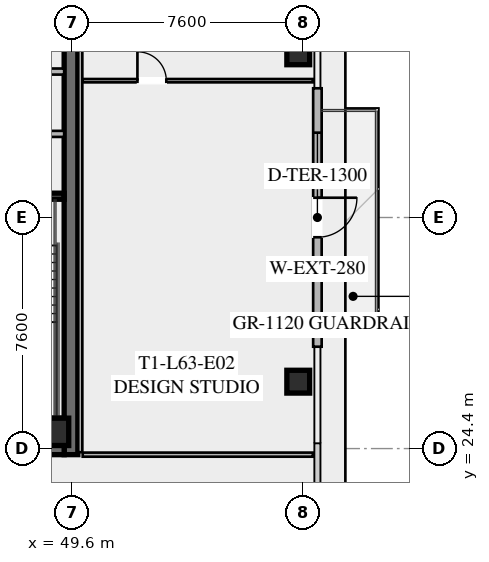
"""IFC4 building model, lengths in metres.
Left out: names, types, materials, properties, quantities, classifications, styles, units other than length and angle.
Written with IfcOpenShell. Run it as: python <this file> out.ifc"""

import sys

from ifc_helpers import new_model, si_unit, direction, frame, frame_2d, origin, origin_2d, place, context, subcontext, project, spatial, rectangle, hollow_rectangle, extrude, element, fill, save


model = new_model("IFC4")
c1 = context("Model", 3, precision=1e-05, world=origin(), true_north=direction((0.0, 1.0)))
c2 = subcontext(c1, "Body", "Model", "MODEL_VIEW")
j1 = project(units=[si_unit("LENGTHUNIT", "METRE"), si_unit("PLANEANGLEUNIT", "RADIAN")], contexts=[c1])
p1 = place(None, origin())
s1 = spatial("IfcSite", under=j1, at=p1, CompositionType="ELEMENT")
p2 = place(p1, origin())
s2 = spatial("IfcBuilding", under=s1, at=p2, CompositionType="ELEMENT")
p3 = place(p2, frame((0.0, 0.0, 232.6)))
s3 = spatial("IfcBuildingStorey", under=s2, at=p3, CompositionType="ELEMENT", Elevation=232.6)
p4 = place(p3, frame((49.575, 39.8, 0.0), z_axis=(0.0, 0.0, 1.0), x_axis=(0.0, -1.0, 0.0)))
e1 = element("IfcWall", 1, at=p4, inside=s3, PredefinedType="SHEAR", context=c2, shape_type="SweptSolid", body=[
    extrude(rectangle(XDim=15.6, YDim=0.45, at=frame_2d((7.8, 0.0))), origin(), (0.0, 0.0, 1.0), 3.55),
])
p5 = place(p3, frame((49.35, 24.425, 0.0), z_axis=(0.0, 0.0, 1.0), x_axis=(-1.0, 0.0, 0.0)))
e2 = element("IfcWall", 2, at=p5, inside=s3, PredefinedType="SHEAR", context=c2, shape_type="SweptSolid", body=[
    extrude(rectangle(XDim=14.7, YDim=0.45, at=frame_2d((7.35, 0.0))), origin(), (0.0, 0.0, 1.0), 3.55),
])
p6 = place(p5, frame((9.05, 0.0, 0.0)))
e3 = element("IfcOpeningElement", 3, at=p6, cuts=e2, PredefinedType="OPENING", context=c2, shape_type="SweptSolid", body=[
    extrude(rectangle(XDim=1.25, YDim=2.25, at=frame_2d((0.625, 1.125))), frame((0.0, 0.235, 0.0), z_axis=(0.0, -1.0, 0.0), x_axis=(1.0, 0.0, 0.0)), (0.0, 0.0, 1.0), 0.47),
])
p7 = place(p5, frame((4.0, 0.0, 0.0)))
e4 = element("IfcOpeningElement", 4, at=p7, cuts=e2, PredefinedType="OPENING", context=c2, shape_type="SweptSolid", body=[
    extrude(rectangle(XDim=1.25, YDim=2.25, at=frame_2d((0.625, 1.125))), frame((0.0, 0.235, 0.0), z_axis=(0.0, -1.0, 0.0), x_axis=(1.0, 0.0, 0.0)), (0.0, 0.0, 1.0), 0.47),
])
p8 = place(p3, frame((49.05, 24.95, 0.0), z_axis=(0.0, 0.0, 1.0), x_axis=(1.0, 0.0, 0.0)))
e5 = element("IfcColumn", 5, at=p8, inside=s3, PredefinedType="COLUMN", context=c2, shape_type="SweptSolid", body=[
    extrude(hollow_rectangle(XDim=0.9, YDim=0.9, WallThickness=0.04, at=origin_2d()), origin(), (0.0, 0.0, 1.0), 3.37),
])
for number, where, z_axis, x_axis in (
    (6, (57.05, 26.6, -0.175), (0.0, 0.0, 1.0), (1.0, 0.0, 0.0)),
    (7, (57.05, 37.4, -0.175), (0.0, 0.0, 1.0), (1.0, 0.0, 0.0)),
):
    element("IfcColumn", number, at=place(p3, frame(where, z_axis=z_axis, x_axis=x_axis)), inside=s3, PredefinedType="COLUMN", context=c2, shape_type="SweptSolid", body=[
        extrude(hollow_rectangle(XDim=0.75, YDim=0.75, WallThickness=0.032, at=origin_2d()), origin(), (0.0, 0.0, 1.0), 3.545),
    ])
p9 = place(p3, frame((57.68, 36.25, 0.0), z_axis=(0.0, 0.0, 1.0), x_axis=(0.0, -1.0, 0.0)))
e8 = element("IfcWall", 8, at=p9, inside=s3, PredefinedType="SOLIDWALL", context=c2, shape_type="SweptSolid", body=[
    extrude(rectangle(XDim=8.5, YDim=0.28, at=frame_2d((4.25, 0.0))), origin(), (0.0, 0.0, 1.0), 3.37),
])
p10 = place(p9, frame((3.6, 0.0, 0.0)))
e9 = element("IfcOpeningElement", 9, at=p10, cuts=e8, PredefinedType="OPENING", context=c2, shape_type="SweptSolid", body=[
    extrude(rectangle(XDim=1.3, YDim=2.15, at=frame_2d((0.65, 1.075))), frame((0.0, 0.15, 0.0), z_axis=(0.0, -1.0, 0.0), x_axis=(1.0, 0.0, 0.0)), (0.0, 0.0, 1.0), 0.3),
])
p11 = place(p9, frame((1.46, 0.0, 0.85)))
e10 = element("IfcOpeningElement", 10, at=p11, cuts=e8, PredefinedType="OPENING", context=c2, shape_type="SweptSolid", body=[
    extrude(rectangle(XDim=1.8, YDim=1.92, at=frame_2d((0.9, 0.96))), frame((0.0, 0.15, 0.0), z_axis=(0.0, -1.0, 0.0), x_axis=(1.0, 0.0, 0.0)), (0.0, 0.0, 1.0), 0.3),
])
for number, where, z_axis, x_axis in (
    (11, (45.7, 32.7, 0.0), (0.0, 0.0, 1.0), (1.0, 0.0, 0.0)),
    (12, (45.7, 25.3, 0.0), (0.0, 0.0, 1.0), (1.0, 0.0, 0.0)),
):
    element("IfcWall", number, at=place(p3, frame(where, z_axis=z_axis, x_axis=x_axis)), inside=s3, PredefinedType="SHEAR", context=c2, shape_type="SweptSolid", body=[
        extrude(rectangle(XDim=3.65, YDim=0.2, at=frame_2d((1.825, 0.0))), origin(), (0.0, 0.0, 1.0), 3.37),
    ])
for number, where, z_axis, x_axis in (
    (13, (46.05, 34.75, 0.0), (0.0, 0.0, 1.0), (1.0, 0.0, 0.0)),
    (14, (46.05, 36.8, 0.0), (0.0, 0.0, 1.0), (1.0, 0.0, 0.0)),
):
    element("IfcWall", number, at=place(p3, frame(where, z_axis=z_axis, x_axis=x_axis)), inside=s3, PredefinedType="SOLIDWALL", context=c2, shape_type="SweptSolid", body=[
        extrude(rectangle(XDim=3.3, YDim=0.2, at=frame_2d((1.65, 0.0))), origin(), (0.0, 0.0, 1.0), 3.37),
    ])
p12 = place(p3, frame((49.88, 39.72, 0.0), z_axis=(0.0, 0.0, 1.0), x_axis=(0.0, -1.0, 0.0)))
e15 = element("IfcWall", 15, at=p12, inside=s3, PredefinedType="PARTITIONING", context=c2, shape_type="SweptSolid", body=[
    extrude(rectangle(XDim=15.44, YDim=0.135, at=frame_2d((7.72, 0.0))), origin(), (0.0, 0.0, 1.0), 2.723),
])
p13 = place(p3, frame((49.96, 24.2, 0.0), z_axis=(0.0, 0.0, 1.0), x_axis=(1.0, 0.0, 0.0)))
e16 = element("IfcWall", 16, at=p13, inside=s3, PredefinedType="PARTITIONING", context=c2, shape_type="SweptSolid", body=[
    extrude(rectangle(XDim=7.57, YDim=0.135, at=frame_2d((3.785, 0.0))), origin(), (0.0, 0.0, 1.0), 2.723),
])
p14 = place(p3, frame((49.96, 36.5, 0.0), z_axis=(0.0, 0.0, 1.0), x_axis=(1.0, 0.0, 0.0)))
e17 = element("IfcWall", 17, at=p14, inside=s3, PredefinedType="PARTITIONING", context=c2, shape_type="SweptSolid", body=[
    extrude(rectangle(XDim=7.57, YDim=0.11, at=frame_2d((3.785, 0.0))), origin(), (0.0, 0.0, 1.0), 2.723),
])
p15 = place(p14, frame((1.8, 0.0, 0.0)))
e18 = element("IfcOpeningElement", 18, at=p15, cuts=e17, PredefinedType="OPENING", context=c2, shape_type="SweptSolid", body=[
    extrude(rectangle(XDim=0.95, YDim=2.05, at=frame_2d((0.475, 1.025))), frame((0.0, 0.065, 0.0), z_axis=(0.0, -1.0, 0.0), x_axis=(1.0, 0.0, 0.0)), (0.0, 0.0, 1.0), 0.13),
])
p16 = place(p10, origin())
e19 = element("IfcDoor", 19, at=p16, inside=s3, OperationType="SINGLE_SWING_LEFT", PredefinedType="DOOR", context=c2, shape_type="SweptSolid", body=[
    extrude(rectangle(XDim=1.3, YDim=2.15, at=frame_2d((0.65, 1.075))), frame((0.0, 0.025, 0.0), z_axis=(0.0, -1.0, 0.0), x_axis=(1.0, 0.0, 0.0)), (0.0, 0.0, 1.0), 0.05),
])
fill(e9, e19)
p17 = place(p11, origin())
e20 = element("IfcWindow", 20, at=p17, inside=s3, PartitioningType="SINGLE_PANEL", PredefinedType="WINDOW", context=c2, shape_type="SweptSolid", body=[
    extrude(rectangle(XDim=1.8, YDim=1.92, at=frame_2d((0.9, 0.96))), frame((0.0, 0.03, 0.0), z_axis=(0.0, -1.0, 0.0), x_axis=(1.0, 0.0, 0.0)), (0.0, 0.0, 1.0), 0.06),
])
fill(e10, e20)
p18 = place(p15, origin())
e21 = element("IfcDoor", 21, at=p18, inside=s3, OperationType="SINGLE_SWING_LEFT", PredefinedType="DOOR", context=c2, shape_type="SweptSolid", body=[
    extrude(rectangle(XDim=0.95, YDim=2.05, at=frame_2d((0.475, 1.025))), frame((0.0, 0.025, 0.0), z_axis=(0.0, -1.0, 0.0), x_axis=(1.0, 0.0, 0.0)), (0.0, 0.0, 1.0), 0.05),
])
fill(e18, e21)
save(model, sys.argv[1])
